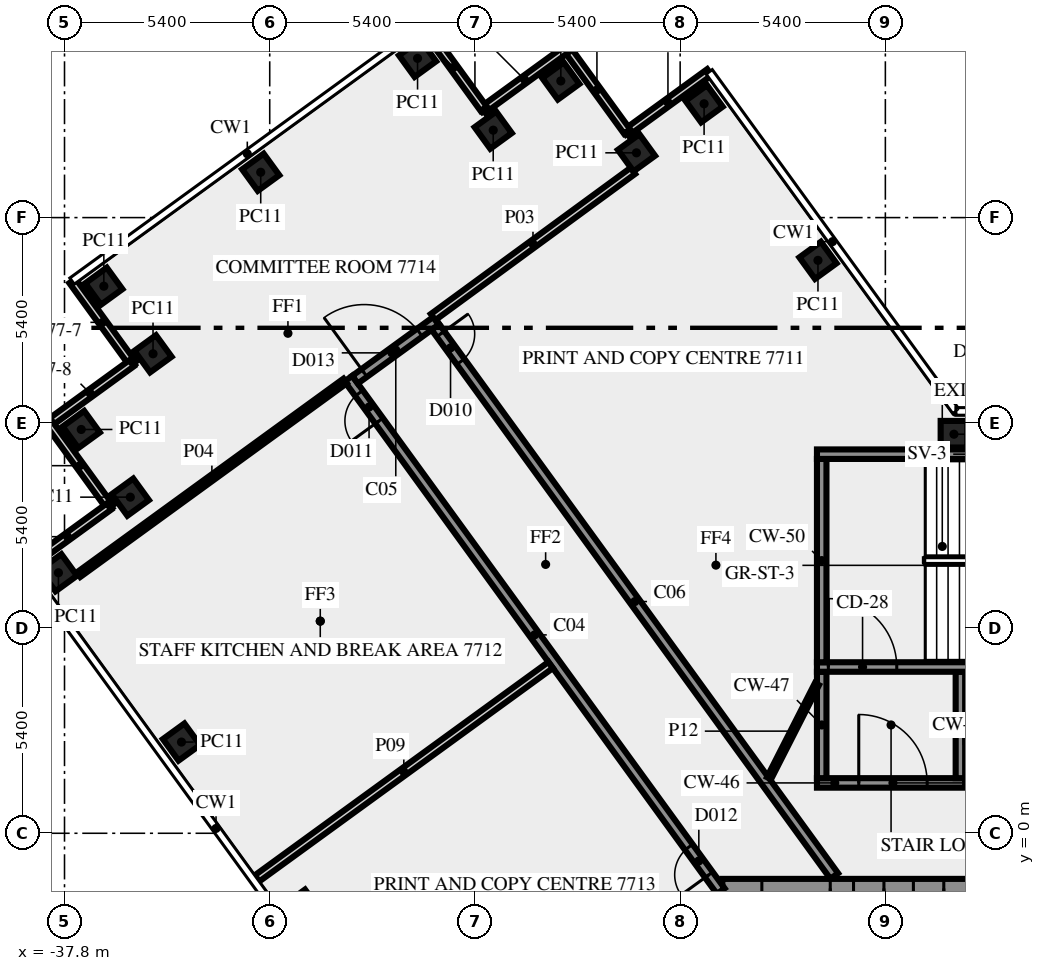
"""IFC4 building model, lengths in metres.
Left out: names, types, materials, properties, quantities, classifications, styles, units other than length and angle.
Written with IfcOpenShell. Run it as: python <this file> out.ifc"""

import sys

from ifc_helpers import new_model, si_unit, direction, frame, frame_2d, origin, origin_2d, place, context, subcontext, project, spatial, rectangle, extrude, element, fill, save


model = new_model("IFC4")
c1 = context("Model", 3, precision=1e-05, world=origin(), true_north=direction((0.0, 1.0)))
c2 = subcontext(c1, "Body", "Model", "MODEL_VIEW")
j1 = project(units=[si_unit("LENGTHUNIT", "METRE"), si_unit("PLANEANGLEUNIT", "RADIAN")], contexts=[c1])
p1 = place(None, origin())
s1 = spatial("IfcSite", under=j1, at=p1, CompositionType="ELEMENT")
p2 = place(p1, origin())
s2 = spatial("IfcBuilding", under=s1, at=p2, CompositionType="ELEMENT")
p3 = place(p2, frame((0.0, 0.0, 331.0)))
s3 = spatial("IfcBuildingStorey", under=s2, at=p3, CompositionType="ELEMENT", Elevation=331.0)
for number, where, z_axis, x_axis in (
    (1, (-17.974, 15.075, 0.0), (0.0, 0.0, 1.0), (-0.588, 0.809, 0.0)),
    (2, (-20.97, 19.195, 0.0), (0.0, 0.0, 1.0), (-0.588, 0.809, 0.0)),
    (3, (-22.749, 17.904, 0.0), (0.0, 0.0, 1.0), (-0.588, 0.809, 0.0)),
    (4, (-24.74, 19.795, 0.0), (0.0, 0.0, 1.0), (-0.588, 0.809, 0.0)),
    (5, (-26.519, 18.5, 0.0), (0.0, 0.0, 1.0), (-0.588, 0.809, 0.0)),
    (6, (-28.51, 20.39, 0.0), (0.0, 0.0, 1.0), (-0.809, -0.588, 0.0)),
    (7, (-32.637, 17.393, 0.0), (0.0, 0.0, 1.0), (-0.809, -0.588, 0.0)),
    (8, (-36.765, 14.395, 0.0), (0.0, 0.0, 1.0), (0.588, -0.809, 0.0)),
    (9, (-35.471, 12.616, 0.0), (0.0, 0.0, 1.0), (-0.809, -0.588, 0.0)),
    (10, (-37.36, 10.625, 0.0), (0.0, 0.0, 1.0), (0.588, -0.809, 0.0)),
    (11, (-36.068, 8.844, 0.0), (0.0, 0.0, 1.0), (0.588, -0.809, 0.0)),
    (12, (-37.96, 6.855, 0.0), (0.0, 0.0, 1.0), (0.588, -0.809, 0.0)),
    (13, (-34.722, 2.4, 0.0), (0.0, 0.0, 1.0), (0.588, -0.809, 0.0)),
    (14, (-31.548, -1.969, 0.0), (0.0, 0.0, 1.0), (0.588, -0.809, 0.0)),
    (15, (-14.395, 10.5, 0.0), (0.0, 0.0, 1.0), (-1.0, 0.0, 0.0)),
):
    element("IfcColumn", number, at=place(p3, frame(where, z_axis=z_axis, x_axis=x_axis)), inside=s3, PredefinedType="COLUMN", context=c2, shape_type="SweptSolid", body=[
        extrude(rectangle(XDim=0.7, YDim=0.7, at=origin_2d()), origin(), (0.0, 0.0, 1.0), 3.65),
    ])
for number, where, z_axis, x_axis in (
    (16, (-20.829, 20.025, 0.0), (0.0, 0.0, 1.0), (-0.809, -0.588, 0.0)),
    (17, (-22.996, 18.466, 0.0), (0.0, 0.0, 1.0), (-0.588, 0.809, 0.0)),
):
    element("IfcWall", number, at=place(p3, frame(where, z_axis=z_axis, x_axis=x_axis)), inside=s3, PredefinedType="SOLIDWALL", context=c2, shape_type="SweptSolid", body=[
        extrude(rectangle(XDim=2.7, YDim=0.2, at=frame_2d((1.35, 0.0))), origin(), (0.0, 0.0, 1.0), 3.65),
    ])
for number, where, z_axis, x_axis in (
    (18, (-24.6, 20.623, 0.0), (0.0, 0.0, 1.0), (-0.809, -0.588, 0.0)),
    (19, (-26.768, 19.063, 0.0), (0.0, 0.0, 1.0), (-0.588, 0.809, 0.0)),
):
    element("IfcWall", number, at=place(p3, frame(where, z_axis=z_axis, x_axis=x_axis)), inside=s3, PredefinedType="SOLIDWALL", context=c2, shape_type="SweptSolid", body=[
        extrude(rectangle(XDim=2.7, YDim=0.2, at=frame_2d((1.35, 0.0))), origin(), (0.0, 0.0, 1.0), 3.65),
    ])
for number, where, z_axis, x_axis in (
    (20, (-37.592, 14.536, 0.0), (0.0, 0.0, 1.0), (0.588, -0.809, 0.0)),
    (21, (-36.032, 12.369, 0.0), (0.0, 0.0, 1.0), (-0.809, -0.588, 0.0)),
    (22, (-38.189, 10.765, 0.0), (0.0, 0.0, 1.0), (0.588, -0.809, 0.0)),
    (23, (-36.629, 8.597, 0.0), (0.0, 0.0, 1.0), (-0.809, -0.588, 0.0)),
):
    element("IfcWall", number, at=place(p3, frame(where, z_axis=z_axis, x_axis=x_axis)), inside=s3, PredefinedType="SOLIDWALL", context=c2, shape_type="SweptSolid", body=[
        extrude(rectangle(XDim=2.7, YDim=0.2, at=frame_2d((1.35, 0.0))), origin(), (0.0, 0.0, 1.0), 3.65),
    ])
p4 = place(p3, frame((20.49, -1.45, 0.0), z_axis=(0.0, 0.0, 1.0), x_axis=(-1.0, 0.0, 0.0)))
e24 = element("IfcWall", 24, at=p4, inside=s3, PredefinedType="SHEAR", context=c2, shape_type="SweptSolid", body=[
    extrude(rectangle(XDim=40.98, YDim=0.5, at=frame_2d((20.49, 0.0))), origin(), (0.0, 0.0, 1.0), 3.65),
])
p5 = place(p4, frame((38.14, 0.0, 0.0)))
e25 = element("IfcOpeningElement", 25, at=p5, cuts=e24, PredefinedType="OPENING", context=c2, shape_type="SweptSolid", body=[
    extrude(rectangle(XDim=1.8, YDim=2.1, at=frame_2d((0.9, 1.05))), frame((0.0, 0.26, 0.0), z_axis=(0.0, -1.0, 0.0), x_axis=(1.0, 0.0, 0.0)), (0.0, 0.0, 1.0), 0.52),
])
p6 = place(p4, frame((36.728, 0.0, 0.0)))
e26 = element("IfcOpeningElement", 26, at=p6, cuts=e24, PredefinedType="OPENING", context=c2, shape_type="SweptSolid", body=[
    extrude(rectangle(XDim=0.8, YDim=2.1, at=frame_2d((0.4, 1.05))), frame((0.0, 0.26, 0.0), z_axis=(0.0, -1.0, 0.0), x_axis=(1.0, 0.0, 0.0)), (0.0, 0.0, 1.0), 0.52),
])
p7 = place(p4, frame((35.153, 0.0, 0.0)))
e27 = element("IfcOpeningElement", 27, at=p7, cuts=e24, PredefinedType="OPENING", context=c2, shape_type="SweptSolid", body=[
    extrude(rectangle(XDim=0.8, YDim=2.1, at=frame_2d((0.4, 1.05))), frame((0.0, 0.26, 0.0), z_axis=(0.0, -1.0, 0.0), x_axis=(1.0, 0.0, 0.0)), (0.0, 0.0, 1.0), 0.52),
])
p8 = place(p4, frame((32.94, 0.0, 0.0)))
e28 = element("IfcOpeningElement", 28, at=p8, cuts=e24, PredefinedType="OPENING", context=c2, shape_type="SweptSolid", body=[
    extrude(rectangle(XDim=0.9, YDim=2.1, at=frame_2d((0.45, 1.05))), frame((0.0, 0.26, 0.0), z_axis=(0.0, -1.0, 0.0), x_axis=(1.0, 0.0, 0.0)), (0.0, 0.0, 1.0), 0.52),
])
p9 = place(p4, frame((31.015, 0.0, 0.0)))
e29 = element("IfcOpeningElement", 29, at=p9, cuts=e24, PredefinedType="OPENING", context=c2, shape_type="SweptSolid", body=[
    extrude(rectangle(XDim=0.8, YDim=2.1, at=frame_2d((0.4, 1.05))), frame((0.0, 0.26, 0.0), z_axis=(0.0, -1.0, 0.0), x_axis=(1.0, 0.0, 0.0)), (0.0, 0.0, 1.0), 0.52),
])
p10 = place(p4, frame((24.765, 0.0, 0.0)))
e30 = element("IfcOpeningElement", 30, at=p10, cuts=e24, PredefinedType="OPENING", context=c2, shape_type="SweptSolid", body=[
    extrude(rectangle(XDim=0.8, YDim=2.1, at=frame_2d((0.4, 1.05))), frame((0.0, 0.26, 0.0), z_axis=(0.0, -1.0, 0.0), x_axis=(1.0, 0.0, 0.0)), (0.0, 0.0, 1.0), 0.52),
])
p11 = place(p4, frame((19.59, 0.0, 0.0)))
e31 = element("IfcOpeningElement", 31, at=p11, cuts=e24, PredefinedType="OPENING", context=c2, shape_type="SweptSolid", body=[
    extrude(rectangle(XDim=2.0, YDim=2.1, at=frame_2d((1.0, 1.05))), frame((0.0, 0.26, 0.0), z_axis=(0.0, -1.0, 0.0), x_axis=(1.0, 0.0, 0.0)), (0.0, 0.0, 1.0), 0.52),
])
p12 = place(p4, frame((15.103, 0.0, 0.0)))
e32 = element("IfcOpeningElement", 32, at=p12, cuts=e24, PredefinedType="OPENING", context=c2, shape_type="SweptSolid", body=[
    extrude(rectangle(XDim=0.9, YDim=2.1, at=frame_2d((0.45, 1.05))), frame((0.0, 0.26, 0.0), z_axis=(0.0, -1.0, 0.0), x_axis=(1.0, 0.0, 0.0)), (0.0, 0.0, 1.0), 0.52),
])
p13 = place(p4, frame((13.04, 0.0, 0.0)))
e33 = element("IfcOpeningElement", 33, at=p13, cuts=e24, PredefinedType="OPENING", context=c2, shape_type="SweptSolid", body=[
    extrude(rectangle(XDim=0.9, YDim=2.1, at=frame_2d((0.45, 1.05))), frame((0.0, 0.26, 0.0), z_axis=(0.0, -1.0, 0.0), x_axis=(1.0, 0.0, 0.0)), (0.0, 0.0, 1.0), 0.52),
])
p14 = place(p4, frame((10.177, 0.0, 0.0)))
e34 = element("IfcOpeningElement", 34, at=p14, cuts=e24, PredefinedType="OPENING", context=c2, shape_type="SweptSolid", body=[
    extrude(rectangle(XDim=0.9, YDim=2.1, at=frame_2d((0.45, 1.05))), frame((0.0, 0.26, 0.0), z_axis=(0.0, -1.0, 0.0), x_axis=(1.0, 0.0, 0.0)), (0.0, 0.0, 1.0), 0.52),
])
p15 = place(p4, frame((7.14, 0.0, 0.0)))
e35 = element("IfcOpeningElement", 35, at=p15, cuts=e24, PredefinedType="OPENING", context=c2, shape_type="SweptSolid", body=[
    extrude(rectangle(XDim=0.9, YDim=2.1, at=frame_2d((0.45, 1.05))), frame((0.0, 0.26, 0.0), z_axis=(0.0, -1.0, 0.0), x_axis=(1.0, 0.0, 0.0)), (0.0, 0.0, 1.0), 0.52),
])
p16 = place(p4, frame((4.19, 0.0, 0.0)))
e36 = element("IfcOpeningElement", 36, at=p16, cuts=e24, PredefinedType="OPENING", context=c2, shape_type="SweptSolid", body=[
    extrude(rectangle(XDim=0.9, YDim=2.1, at=frame_2d((0.45, 1.05))), frame((0.0, 0.26, 0.0), z_axis=(0.0, -1.0, 0.0), x_axis=(1.0, 0.0, 0.0)), (0.0, 0.0, 1.0), 0.52),
])
p17 = place(p4, frame((1.04, 0.0, 0.0)))
e37 = element("IfcOpeningElement", 37, at=p17, cuts=e24, PredefinedType="OPENING", context=c2, shape_type="SweptSolid", body=[
    extrude(rectangle(XDim=1.8, YDim=2.1, at=frame_2d((0.9, 1.05))), frame((0.0, 0.26, 0.0), z_axis=(0.0, -1.0, 0.0), x_axis=(1.0, 0.0, 0.0)), (0.0, 0.0, 1.0), 0.52),
])
p18 = place(p3, frame((-18.0, 1.325, 0.0), z_axis=(0.0, 0.0, 1.0), x_axis=(1.0, 0.0, 0.0)))
e38 = element("IfcWall", 38, at=p18, inside=s3, PredefinedType="SHEAR", context=c2, shape_type="SweptSolid", body=[
    extrude(rectangle(XDim=3.9, YDim=0.25, at=frame_2d((1.95, 0.0))), origin(), (0.0, 0.0, 1.0), 3.65),
])
p19 = place(p18, frame((1.1, 0.0, 0.0)))
e39 = element("IfcOpeningElement", 39, at=p19, cuts=e38, PredefinedType="OPENING", context=c2, shape_type="SweptSolid", body=[
    extrude(rectangle(XDim=1.8, YDim=2.1, at=frame_2d((0.9, 1.05))), frame((0.0, 0.135, 0.0), z_axis=(0.0, -1.0, 0.0), x_axis=(1.0, 0.0, 0.0)), (0.0, 0.0, 1.0), 0.27),
])
for number, where, z_axis, x_axis in (
    (40, (-17.875, 1.45, 0.0), (0.0, 0.0, 1.0), (0.0, 1.0, 0.0)),
    (41, (-14.225, 1.45, 0.0), (0.0, 0.0, 1.0), (0.0, 1.0, 0.0)),
):
    element("IfcWall", number, at=place(p3, frame(where, z_axis=z_axis, x_axis=x_axis)), inside=s3, PredefinedType="SHEAR", context=c2, shape_type="SweptSolid", body=[
        extrude(rectangle(XDim=2.8, YDim=0.25, at=frame_2d((1.4, 0.0))), origin(), (0.0, 0.0, 1.0), 3.65),
    ])
p20 = place(p3, frame((-18.0, 4.375, 0.0), z_axis=(0.0, 0.0, 1.0), x_axis=(1.0, 0.0, 0.0)))
e42 = element("IfcWall", 42, at=p20, inside=s3, PredefinedType="SHEAR", context=c2, shape_type="SweptSolid", body=[
    extrude(rectangle(XDim=10.5, YDim=0.25, at=frame_2d((5.25, 0.0))), origin(), (0.0, 0.0, 1.0), 3.65),
])
p21 = place(p20, frame((0.3, 0.0, 0.0)))
e43 = element("IfcOpeningElement", 43, at=p21, cuts=e42, PredefinedType="OPENING", context=c2, shape_type="SweptSolid", body=[
    extrude(rectangle(XDim=1.8, YDim=2.1, at=frame_2d((0.9, 1.05))), frame((0.0, 0.135, 0.0), z_axis=(0.0, -1.0, 0.0), x_axis=(1.0, 0.0, 0.0)), (0.0, 0.0, 1.0), 0.27),
])
p22 = place(p3, frame((-17.875, 4.5, 0.0), z_axis=(0.0, 0.0, 1.0), x_axis=(0.0, 1.0, 0.0)))
e44 = element("IfcWall", 44, at=p22, inside=s3, PredefinedType="SHEAR", context=c2, shape_type="SweptSolid", body=[
    extrude(rectangle(XDim=5.35, YDim=0.25, at=frame_2d((2.675, 0.0))), origin(), (0.0, 0.0, 1.0), 3.65),
])
p23 = place(p3, frame((-18.0, 9.975, 0.0), z_axis=(0.0, 0.0, 1.0), x_axis=(1.0, 0.0, 0.0)))
e45 = element("IfcWall", 45, at=p23, inside=s3, PredefinedType="SHEAR", context=c2, shape_type="SweptSolid", body=[
    extrude(rectangle(XDim=10.5, YDim=0.25, at=frame_2d((5.25, 0.0))), origin(), (0.0, 0.0, 1.0), 3.65),
])
p24 = place(p23, frame((4.5, 0.0, 1.0)))
e46 = element("IfcOpeningElement", 46, at=p24, cuts=e45, PredefinedType="OPENING", context=c2, shape_type="SweptSolid", body=[
    extrude(rectangle(XDim=1.2, YDim=1.2, at=frame_2d((0.6, 0.6))), frame((0.0, 0.135, 0.0), z_axis=(0.0, -1.0, 0.0), x_axis=(1.0, 0.0, 0.0)), (0.0, 0.0, 1.0), 0.27),
])
p25 = place(p3, frame((-20.531, -1.523, 0.0), z_axis=(0.0, 0.0, 1.0), x_axis=(-0.587785867777, 0.809016547199, 0.0)))
e47 = element("IfcWall", 47, at=p25, inside=s3, PredefinedType="SOLIDWALL", context=c2, shape_type="SweptSolid", body=[
    extrude(rectangle(XDim=16.67, YDim=0.25, at=frame_2d((8.335, 0.0))), origin(), (0.0, 0.0, 1.0), 3.65),
])
p26 = place(p25, frame((0.533, 0.0, 0.0)))
e48 = element("IfcOpeningElement", 48, at=p26, cuts=e47, PredefinedType="OPENING", context=c2, shape_type="SweptSolid", body=[
    extrude(rectangle(XDim=0.9, YDim=2.1, at=frame_2d((0.45, 1.05))), frame((0.0, 0.135, 0.0), z_axis=(0.0, -1.0, 0.0), x_axis=(1.0, 0.0, 0.0)), (0.0, 0.0, 1.0), 0.27),
])
p27 = place(p25, frame((15.296, 0.0, 0.0)))
e49 = element("IfcOpeningElement", 49, at=p27, cuts=e47, PredefinedType="OPENING", context=c2, shape_type="SweptSolid", body=[
    extrude(rectangle(XDim=0.9, YDim=2.1, at=frame_2d((0.45, 1.05))), frame((0.0, 0.135, 0.0), z_axis=(0.0, -1.0, 0.0), x_axis=(1.0, 0.0, 0.0)), (0.0, 0.0, 1.0), 0.27),
])
p28 = place(p3, frame((-30.155, 11.936, 0.0), z_axis=(0.0, 0.0, 1.0), x_axis=(0.809038743598, 0.587755315891, 0.0)))
e50 = element("IfcWall", 50, at=p28, inside=s3, PredefinedType="SOLIDWALL", context=c2, shape_type="SweptSolid", body=[
    extrude(rectangle(XDim=2.65, YDim=0.25, at=frame_2d((1.325, 0.0))), origin(), (0.0, 0.0, 1.0), 3.65),
])
p29 = place(p28, frame((0.3, 0.0, 0.0)))
e51 = element("IfcOpeningElement", 51, at=p29, cuts=e50, PredefinedType="OPENING", context=c2, shape_type="SweptSolid", body=[
    extrude(rectangle(XDim=1.8, YDim=2.1, at=frame_2d((0.9, 1.05))), frame((0.0, 0.135, 0.0), z_axis=(0.0, -1.0, 0.0), x_axis=(1.0, 0.0, 0.0)), (0.0, 0.0, 1.0), 0.27),
])
p30 = place(p3, frame((-28.039, 13.319, 0.0), z_axis=(0.0, 0.0, 1.0), x_axis=(0.587791911753, -0.809012155952, 0.0)))
e52 = element("IfcWall", 52, at=p30, inside=s3, PredefinedType="SOLIDWALL", context=c2, shape_type="SweptSolid", body=[
    extrude(rectangle(XDim=17.853, YDim=0.25, at=frame_2d((8.927, 0.0))), origin(), (0.0, 0.0, 1.0), 3.65),
])
p31 = place(p30, frame((0.225, 0.0, 0.0)))
e53 = element("IfcOpeningElement", 53, at=p31, cuts=e52, PredefinedType="OPENING", context=c2, shape_type="SweptSolid", body=[
    extrude(rectangle(XDim=0.9, YDim=2.1, at=frame_2d((0.45, 1.05))), frame((0.0, 0.135, 0.0), z_axis=(0.0, -1.0, 0.0), x_axis=(1.0, 0.0, 0.0)), (0.0, 0.0, 1.0), 0.27),
])
p32 = place(p3, frame((-28.101, 13.583, 0.0), z_axis=(0.0, 0.0, 1.0), x_axis=(0.80699548015, 0.590557613631, 0.0)))
e54 = element("IfcWall", 54, at=p32, inside=s3, PredefinedType="SOLIDWALL", context=c2, shape_type="SweptSolid", body=[
    extrude(rectangle(XDim=6.515, YDim=0.2, at=frame_2d((3.258, 0.0))), origin(), (0.0, 0.0, 1.0), 3.65),
])
p33 = place(p3, frame((-37.429, 6.805, 0.0), z_axis=(0.0, 0.0, 1.0), x_axis=(0.809020922653, 0.587779845444, 0.0)))
e55 = element("IfcWall", 55, at=p33, inside=s3, PredefinedType="PARTITIONING", context=c2, shape_type="SweptSolid", body=[
    extrude(rectangle(XDim=8.67, YDim=0.15, at=frame_2d((4.335, 0.0))), origin(), (0.0, 0.0, 1.0), 3.65),
])
p34 = place(p3, frame((-25.008, 4.427, 0.0), z_axis=(0.0, 0.0, 1.0), x_axis=(-0.808994684961, -0.587815957341, 0.0)))
e56 = element("IfcWall", 56, at=p34, inside=s3, PredefinedType="SOLIDWALL", context=c2, shape_type="SweptSolid", body=[
    extrude(rectangle(XDim=9.55, YDim=0.2, at=frame_2d((4.775, 0.0))), origin(), (0.0, 0.0, 1.0), 2.95),
])
p35 = place(p3, frame((-19.261, 1.45, 0.0), z_axis=(0.0, 0.0, 1.0), x_axis=(0.453950796792, 0.891026752736, 0.0)))
e57 = element("IfcWall", 57, at=p35, inside=s3, PredefinedType="PARTITIONING", context=c2, shape_type="SweptSolid", body=[
    extrude(rectangle(XDim=2.778, YDim=0.12, at=frame_2d((1.389, 0.0))), origin(), (0.0, 0.0, 1.0), 3.65),
])
p36 = place(p5, origin())
e58 = element("IfcDoor", 58, at=p36, inside=s3, OperationType="DOUBLE_DOOR_SINGLE_SWING", PredefinedType="DOOR", context=c2, shape_type="SweptSolid", body=[
    extrude(rectangle(XDim=1.8, YDim=2.1, at=frame_2d((0.9, 1.05))), frame((0.0, 0.025, 0.0), z_axis=(0.0, -1.0, 0.0), x_axis=(1.0, 0.0, 0.0)), (0.0, 0.0, 1.0), 0.05),
])
fill(e25, e58)
p37 = place(p6, origin())
e59 = element("IfcDoor", 59, at=p37, inside=s3, OperationType="SINGLE_SWING_RIGHT", PredefinedType="DOOR", context=c2, shape_type="SweptSolid", body=[
    extrude(rectangle(XDim=0.8, YDim=2.1, at=frame_2d((0.4, 1.05))), frame((0.0, 0.025, 0.0), z_axis=(0.0, -1.0, 0.0), x_axis=(1.0, 0.0, 0.0)), (0.0, 0.0, 1.0), 0.05),
])
fill(e26, e59)
p38 = place(p7, origin())
e60 = element("IfcDoor", 60, at=p38, inside=s3, OperationType="SINGLE_SWING_RIGHT", PredefinedType="DOOR", context=c2, shape_type="SweptSolid", body=[
    extrude(rectangle(XDim=0.8, YDim=2.1, at=frame_2d((0.4, 1.05))), frame((0.0, 0.025, 0.0), z_axis=(0.0, -1.0, 0.0), x_axis=(1.0, 0.0, 0.0)), (0.0, 0.0, 1.0), 0.05),
])
fill(e27, e60)
p39 = place(p19, origin())
e61 = element("IfcDoor", 61, at=p39, inside=s3, OperationType="DOUBLE_DOOR_SINGLE_SWING", PredefinedType="DOOR", context=c2, shape_type="SweptSolid", body=[
    extrude(rectangle(XDim=1.8, YDim=2.1, at=frame_2d((0.9, 1.05))), frame((0.0, 0.025, 0.0), z_axis=(0.0, -1.0, 0.0), x_axis=(1.0, 0.0, 0.0)), (0.0, 0.0, 1.0), 0.05),
])
fill(e39, e61)
p40 = place(p21, origin())
e62 = element("IfcDoor", 62, at=p40, inside=s3, OperationType="DOUBLE_DOOR_SINGLE_SWING", PredefinedType="DOOR", context=c2, shape_type="SweptSolid", body=[
    extrude(rectangle(XDim=1.8, YDim=2.1, at=frame_2d((0.9, 1.05))), frame((0.0, 0.025, 0.0), z_axis=(0.0, -1.0, 0.0), x_axis=(1.0, 0.0, 0.0)), (0.0, 0.0, 1.0), 0.05),
])
fill(e43, e62)
p41 = place(p29, origin())
e63 = element("IfcDoor", 63, at=p41, inside=s3, OperationType="DOUBLE_DOOR_SINGLE_SWING", PredefinedType="DOOR", context=c2, shape_type="SweptSolid", body=[
    extrude(rectangle(XDim=1.8, YDim=2.1, at=frame_2d((0.9, 1.05))), frame((0.0, 0.025, 0.0), z_axis=(0.0, -1.0, 0.0), x_axis=(1.0, 0.0, 0.0)), (0.0, 0.0, 1.0), 0.05),
])
fill(e51, e63)
p42 = place(p31, origin())
e64 = element("IfcDoor", 64, at=p42, inside=s3, OperationType="SINGLE_SWING_LEFT", PredefinedType="DOOR", context=c2, shape_type="SweptSolid", body=[
    extrude(rectangle(XDim=0.9, YDim=2.1, at=frame_2d((0.45, 1.05))), frame((0.0, 0.025, 0.0), z_axis=(0.0, -1.0, 0.0), x_axis=(1.0, 0.0, 0.0)), (0.0, 0.0, 1.0), 0.05),
])
fill(e53, e64)
p43 = place(p26, origin())
e65 = element("IfcDoor", 65, at=p43, inside=s3, OperationType="SINGLE_SWING_LEFT", PredefinedType="DOOR", context=c2, shape_type="SweptSolid", body=[
    extrude(rectangle(XDim=0.9, YDim=2.1, at=frame_2d((0.45, 1.05))), frame((0.0, 0.025, 0.0), z_axis=(0.0, -1.0, 0.0), x_axis=(1.0, 0.0, 0.0)), (0.0, 0.0, 1.0), 0.05),
])
fill(e48, e65)
p44 = place(p27, origin())
e66 = element("IfcDoor", 66, at=p44, inside=s3, OperationType="SINGLE_SWING_RIGHT", PredefinedType="DOOR", context=c2, shape_type="SweptSolid", body=[
    extrude(rectangle(XDim=0.9, YDim=2.1, at=frame_2d((0.45, 1.05))), frame((0.0, 0.025, 0.0), z_axis=(0.0, -1.0, 0.0), x_axis=(1.0, 0.0, 0.0)), (0.0, 0.0, 1.0), 0.05),
])
fill(e49, e66)
save(model, sys.argv[1])
